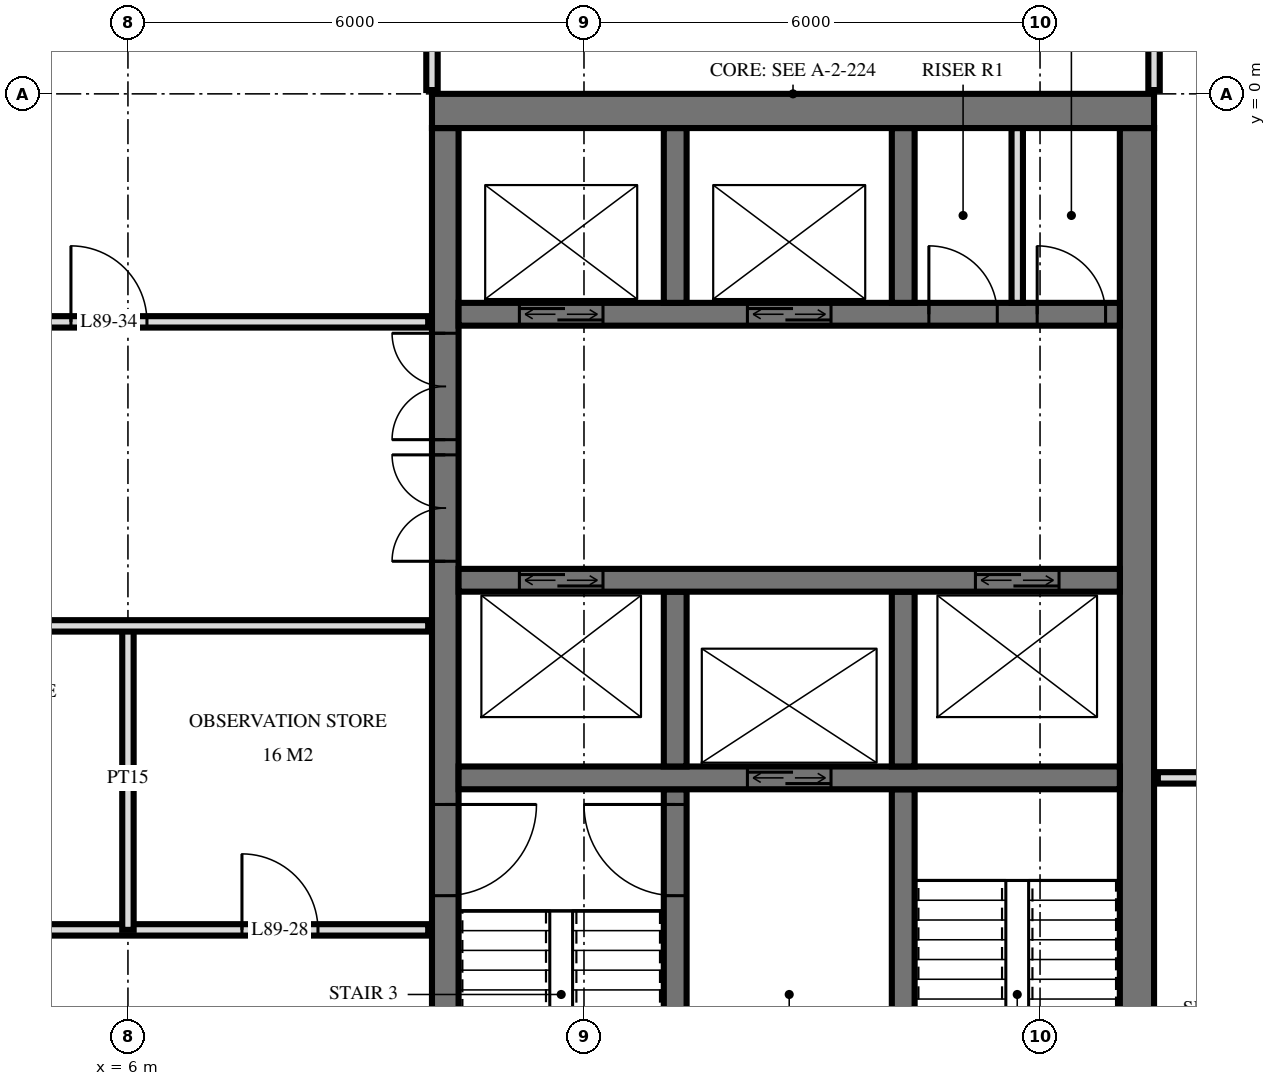
"""IFC4 building model, lengths in metres.
Left out: names, types, materials, properties, quantities, classifications, styles, units other than length and angle.
Written with IfcOpenShell. Run it as: python <this file> out.ifc"""

import sys

from ifc_helpers import new_model, si_unit, direction, frame, frame_2d, origin, place, context, subcontext, project, spatial, rectangle, extrude, element, fill, save


model = new_model("IFC4")
c1 = context("Model", 3, precision=1e-05, world=origin(), true_north=direction((0.0, 1.0)))
c2 = subcontext(c1, "Body", "Model", "MODEL_VIEW")
j1 = project(units=[si_unit("LENGTHUNIT", "METRE"), si_unit("PLANEANGLEUNIT", "RADIAN")], contexts=[c1])
p1 = place(None, origin())
s1 = spatial("IfcSite", under=j1, at=p1, CompositionType="ELEMENT")
p2 = place(p1, origin())
s2 = spatial("IfcBuilding", under=s1, at=p2, CompositionType="ELEMENT")
p3 = place(p2, frame((0.0, 0.0, 338.6)))
s3 = spatial("IfcBuildingStorey", under=s2, at=p3, CompositionType="ELEMENT", Elevation=338.6)
p4 = place(p3, frame((10.0, -0.225, 0.0), z_axis=(0.0, 0.0, 1.0), x_axis=(1.0, 0.0, 0.0)))
e1 = element("IfcWall", 1, at=p4, inside=s3, PredefinedType="SHEAR", context=c2, shape_type="SweptSolid", body=[
    extrude(rectangle(XDim=9.5, YDim=0.45, at=frame_2d((4.75, 0.0))), origin(), (0.0, 0.0, 1.0), 4.0),
])
p5 = place(p3, frame((10.175, -14.55, 0.0), z_axis=(0.0, 0.0, 1.0), x_axis=(0.0, 1.0, 0.0)))
e2 = element("IfcWall", 2, at=p5, inside=s3, PredefinedType="SHEAR", context=c2, shape_type="SweptSolid", body=[
    extrude(rectangle(XDim=14.1, YDim=0.35, at=frame_2d((7.05, 0.0))), origin(), (0.0, 0.0, 1.0), 4.0),
])
p6 = place(p5, frame((8.4, 0.0, 0.0)))
e3 = element("IfcOpeningElement", 3, at=p6, cuts=e2, PredefinedType="OPENING", context=c2, shape_type="SweptSolid", body=[
    extrude(rectangle(XDim=1.4, YDim=2.4, at=frame_2d((0.7, 1.2))), frame((0.0, 0.185, 0.0), z_axis=(0.0, -1.0, 0.0), x_axis=(1.0, 0.0, 0.0)), (0.0, 0.0, 1.0), 0.37),
])
p7 = place(p5, frame((10.0, 0.0, 0.0)))
e4 = element("IfcOpeningElement", 4, at=p7, cuts=e2, PredefinedType="OPENING", context=c2, shape_type="SweptSolid", body=[
    extrude(rectangle(XDim=1.4, YDim=2.4, at=frame_2d((0.7, 1.2))), frame((0.0, 0.185, 0.0), z_axis=(0.0, -1.0, 0.0), x_axis=(1.0, 0.0, 0.0)), (0.0, 0.0, 1.0), 0.37),
])
p8 = place(p5, frame((4.0, 0.0, 0.0)))
e5 = element("IfcOpeningElement", 5, at=p8, cuts=e2, PredefinedType="OPENING", context=c2, shape_type="SweptSolid", body=[
    extrude(rectangle(XDim=1.2, YDim=2.1, at=frame_2d((0.6, 1.05))), frame((0.0, 0.185, 0.0), z_axis=(0.0, -1.0, 0.0), x_axis=(1.0, 0.0, 0.0)), (0.0, 0.0, 1.0), 0.37),
])
p9 = place(p3, frame((19.275, -14.55, 0.0), z_axis=(0.0, 0.0, 1.0), x_axis=(0.0, 1.0, 0.0)))
e6 = element("IfcWall", 6, at=p9, inside=s3, PredefinedType="SHEAR", context=c2, shape_type="SweptSolid", body=[
    extrude(rectangle(XDim=14.1, YDim=0.45, at=frame_2d((7.05, 0.0))), origin(), (0.0, 0.0, 1.0), 4.0),
])
p10 = place(p3, frame((10.35, -2.9, 0.0), z_axis=(0.0, 0.0, 1.0), x_axis=(1.0, 0.0, 0.0)))
e7 = element("IfcWall", 7, at=p10, inside=s3, PredefinedType="SHEAR", context=c2, shape_type="SweptSolid", body=[
    extrude(rectangle(XDim=8.7, YDim=0.3, at=frame_2d((4.35, 0.0))), origin(), (0.0, 0.0, 1.0), 4.0),
])
p11 = place(p10, frame((0.8, 0.0, 0.0)))
e8 = element("IfcOpeningElement", 8, at=p11, cuts=e7, PredefinedType="OPENING", context=c2, shape_type="SweptSolid", body=[
    extrude(rectangle(XDim=1.1, YDim=2.1, at=frame_2d((0.55, 1.05))), frame((0.0, 0.16, 0.0), z_axis=(0.0, -1.0, 0.0), x_axis=(1.0, 0.0, 0.0)), (0.0, 0.0, 1.0), 0.32),
])
p12 = place(p10, frame((3.8, 0.0, 0.0)))
e9 = element("IfcOpeningElement", 9, at=p12, cuts=e7, PredefinedType="OPENING", context=c2, shape_type="SweptSolid", body=[
    extrude(rectangle(XDim=1.1, YDim=2.1, at=frame_2d((0.55, 1.05))), frame((0.0, 0.16, 0.0), z_axis=(0.0, -1.0, 0.0), x_axis=(1.0, 0.0, 0.0)), (0.0, 0.0, 1.0), 0.32),
])
p13 = place(p10, frame((6.188, 0.0, 0.0)))
e10 = element("IfcOpeningElement", 10, at=p13, cuts=e7, PredefinedType="OPENING", context=c2, shape_type="SweptSolid", body=[
    extrude(rectangle(XDim=0.9, YDim=2.1, at=frame_2d((0.45, 1.05))), frame((0.0, 0.16, 0.0), z_axis=(0.0, -1.0, 0.0), x_axis=(1.0, 0.0, 0.0)), (0.0, 0.0, 1.0), 0.32),
])
p14 = place(p10, frame((7.613, 0.0, 0.0)))
e11 = element("IfcOpeningElement", 11, at=p14, cuts=e7, PredefinedType="OPENING", context=c2, shape_type="SweptSolid", body=[
    extrude(rectangle(XDim=0.9, YDim=2.1, at=frame_2d((0.45, 1.05))), frame((0.0, 0.16, 0.0), z_axis=(0.0, -1.0, 0.0), x_axis=(1.0, 0.0, 0.0)), (0.0, 0.0, 1.0), 0.32),
])
p15 = place(p3, frame((10.35, -6.4, 0.0), z_axis=(0.0, 0.0, 1.0), x_axis=(1.0, 0.0, 0.0)))
e12 = element("IfcWall", 12, at=p15, inside=s3, PredefinedType="SHEAR", context=c2, shape_type="SweptSolid", body=[
    extrude(rectangle(XDim=8.7, YDim=0.3, at=frame_2d((4.35, 0.0))), origin(), (0.0, 0.0, 1.0), 4.0),
])
p16 = place(p15, frame((0.8, 0.0, 0.0)))
e13 = element("IfcOpeningElement", 13, at=p16, cuts=e12, PredefinedType="OPENING", context=c2, shape_type="SweptSolid", body=[
    extrude(rectangle(XDim=1.1, YDim=2.1, at=frame_2d((0.55, 1.05))), frame((0.0, 0.16, 0.0), z_axis=(0.0, -1.0, 0.0), x_axis=(1.0, 0.0, 0.0)), (0.0, 0.0, 1.0), 0.32),
])
p17 = place(p15, frame((6.8, 0.0, 0.0)))
e14 = element("IfcOpeningElement", 14, at=p17, cuts=e12, PredefinedType="OPENING", context=c2, shape_type="SweptSolid", body=[
    extrude(rectangle(XDim=1.1, YDim=2.1, at=frame_2d((0.55, 1.05))), frame((0.0, 0.16, 0.0), z_axis=(0.0, -1.0, 0.0), x_axis=(1.0, 0.0, 0.0)), (0.0, 0.0, 1.0), 0.32),
])
p18 = place(p3, frame((10.35, -9.0, 0.0), z_axis=(0.0, 0.0, 1.0), x_axis=(1.0, 0.0, 0.0)))
e15 = element("IfcWall", 15, at=p18, inside=s3, PredefinedType="SHEAR", context=c2, shape_type="SweptSolid", body=[
    extrude(rectangle(XDim=8.7, YDim=0.3, at=frame_2d((4.35, 0.0))), origin(), (0.0, 0.0, 1.0), 4.0),
])
p19 = place(p18, frame((3.8, 0.0, 0.0)))
e16 = element("IfcOpeningElement", 16, at=p19, cuts=e15, PredefinedType="OPENING", context=c2, shape_type="SweptSolid", body=[
    extrude(rectangle(XDim=1.1, YDim=2.1, at=frame_2d((0.55, 1.05))), frame((0.0, 0.16, 0.0), z_axis=(0.0, -1.0, 0.0), x_axis=(1.0, 0.0, 0.0)), (0.0, 0.0, 1.0), 0.32),
])
for number, where, z_axis, x_axis in (
    (17, (13.2, -2.75, 0.0), (0.0, 0.0, 1.0), (0.0, 1.0, 0.0)),
    (18, (13.2, -8.85, 0.0), (0.0, 0.0, 1.0), (0.0, 1.0, 0.0)),
):
    element("IfcWall", number, at=place(p3, frame(where, z_axis=z_axis, x_axis=x_axis)), inside=s3, PredefinedType="SHEAR", context=c2, shape_type="SweptSolid", body=[
        extrude(rectangle(XDim=2.3, YDim=0.3, at=frame_2d((1.15, 0.0))), origin(), (0.0, 0.0, 1.0), 4.0),
    ])
p20 = place(p3, frame((13.2, -14.55, 0.0), z_axis=(0.0, 0.0, 1.0), x_axis=(0.0, 1.0, 0.0)))
e19 = element("IfcWall", 19, at=p20, inside=s3, PredefinedType="SHEAR", context=c2, shape_type="SweptSolid", body=[
    extrude(rectangle(XDim=5.4, YDim=0.3, at=frame_2d((2.7, 0.0))), origin(), (0.0, 0.0, 1.0), 4.0),
])
p21 = place(p20, frame((4.0, 0.0, 0.0)))
e20 = element("IfcOpeningElement", 20, at=p21, cuts=e19, PredefinedType="OPENING", context=c2, shape_type="SweptSolid", body=[
    extrude(rectangle(XDim=1.2, YDim=2.1, at=frame_2d((0.6, 1.05))), frame((0.0, 0.16, 0.0), z_axis=(0.0, -1.0, 0.0), x_axis=(1.0, 0.0, 0.0)), (0.0, 0.0, 1.0), 0.32),
])
for number, where, z_axis, x_axis in (
    (21, (16.2, -2.75, 0.0), (0.0, 0.0, 1.0), (0.0, 1.0, 0.0)),
    (22, (16.2, -8.85, 0.0), (0.0, 0.0, 1.0), (0.0, 1.0, 0.0)),
):
    element("IfcWall", number, at=place(p3, frame(where, z_axis=z_axis, x_axis=x_axis)), inside=s3, PredefinedType="SHEAR", context=c2, shape_type="SweptSolid", body=[
        extrude(rectangle(XDim=2.3, YDim=0.3, at=frame_2d((1.15, 0.0))), origin(), (0.0, 0.0, 1.0), 4.0),
    ])
p22 = place(p3, frame((16.2, -14.55, 0.0), z_axis=(0.0, 0.0, 1.0), x_axis=(0.0, 1.0, 0.0)))
e23 = element("IfcWall", 23, at=p22, inside=s3, PredefinedType="SHEAR", context=c2, shape_type="SweptSolid", body=[
    extrude(rectangle(XDim=5.4, YDim=0.3, at=frame_2d((2.7, 0.0))), origin(), (0.0, 0.0, 1.0), 4.0),
])
p23 = place(p22, frame((0.2, 0.0, 0.0)))
e24 = element("IfcOpeningElement", 24, at=p23, cuts=e23, PredefinedType="OPENING", context=c2, shape_type="SweptSolid", body=[
    extrude(rectangle(XDim=1.2, YDim=2.1, at=frame_2d((0.6, 1.05))), frame((0.0, 0.16, 0.0), z_axis=(0.0, -1.0, 0.0), x_axis=(1.0, 0.0, 0.0)), (0.0, 0.0, 1.0), 0.32),
])
p24 = place(p3, frame((17.7, -2.75, 0.0), z_axis=(0.0, 0.0, 1.0), x_axis=(0.0, 1.0, 0.0)))
e25 = element("IfcWall", 25, at=p24, inside=s3, PredefinedType="PARTITIONING", context=c2, shape_type="SweptSolid", body=[
    extrude(rectangle(XDim=2.3, YDim=0.15, at=frame_2d((1.15, 0.0))), origin(), (0.0, 0.0, 1.0), 3.7),
])
p25 = place(p3, frame((19.5, 0.05, 0.0), z_axis=(0.0, 0.0, 1.0), x_axis=(0.0, 1.0, 0.0)))
e26 = element("IfcWall", 26, at=p25, inside=s3, PredefinedType="PARTITIONING", context=c2, shape_type="SweptSolid", body=[
    extrude(rectangle(XDim=4.403, YDim=0.15, at=frame_2d((2.202, 0.0))), origin(), (0.0, 0.0, 1.0), 3.72),
])
p26 = place(p3, frame((10.0, 0.05, 0.0), z_axis=(0.0, 0.0, 1.0), x_axis=(0.0, 1.0, 0.0)))
e27 = element("IfcWall", 27, at=p26, inside=s3, PredefinedType="PARTITIONING", context=c2, shape_type="SweptSolid", body=[
    extrude(rectangle(XDim=4.702, YDim=0.15, at=frame_2d((2.351, 0.0))), origin(), (0.0, 0.0, 1.0), 3.72),
])
p27 = place(p3, frame((6.0, -11.0, 0.0), z_axis=(0.0, 0.0, 1.0), x_axis=(0.0, 1.0, 0.0)))
e28 = element("IfcWall", 28, at=p27, inside=s3, PredefinedType="PARTITIONING", context=c2, shape_type="SweptSolid", body=[
    extrude(rectangle(XDim=4.0, YDim=0.15, at=frame_2d((2.0, 0.0))), origin(), (0.0, 0.0, 1.0), 3.72),
])
p28 = place(p3, frame((-9.95, -11.0, 0.0), z_axis=(0.0, 0.0, 1.0), x_axis=(1.0, 0.0, 0.0)))
e29 = element("IfcWall", 29, at=p28, inside=s3, PredefinedType="PARTITIONING", context=c2, shape_type="SweptSolid", body=[
    extrude(rectangle(XDim=19.9, YDim=0.15, at=frame_2d((9.95, 0.0))), origin(), (0.0, 0.0, 1.0), 3.72),
])
p29 = place(p28, frame((9.45, 0.0, 0.0)))
e30 = element("IfcOpeningElement", 30, at=p29, cuts=e29, PredefinedType="OPENING", context=c2, shape_type="SweptSolid", body=[
    extrude(rectangle(XDim=1.0, YDim=2.1, at=frame_2d((0.5, 1.05))), frame((0.0, 0.085, 0.0), z_axis=(0.0, -1.0, 0.0), x_axis=(1.0, 0.0, 0.0)), (0.0, 0.0, 1.0), 0.17),
])
p30 = place(p28, frame((17.45, 0.0, 0.0)))
e31 = element("IfcOpeningElement", 31, at=p30, cuts=e29, PredefinedType="OPENING", context=c2, shape_type="SweptSolid", body=[
    extrude(rectangle(XDim=1.0, YDim=2.1, at=frame_2d((0.5, 1.05))), frame((0.0, 0.085, 0.0), z_axis=(0.0, -1.0, 0.0), x_axis=(1.0, 0.0, 0.0)), (0.0, 0.0, 1.0), 0.17),
])
p31 = place(p3, frame((19.55, -9.0, 0.0), z_axis=(0.0, 0.0, 1.0), x_axis=(1.0, 0.0, 0.0)))
e32 = element("IfcWall", 32, at=p31, inside=s3, PredefinedType="PARTITIONING", context=c2, shape_type="SweptSolid", body=[
    extrude(rectangle(XDim=2.753, YDim=0.15, at=frame_2d((1.377, 0.0))), origin(), (0.0, 0.0, 1.0), 3.72),
])
p32 = place(p31, frame((0.992, 0.0, 0.0)))
e33 = element("IfcOpeningElement", 33, at=p32, cuts=e32, PredefinedType="OPENING", context=c2, shape_type="SweptSolid", body=[
    extrude(rectangle(XDim=0.9, YDim=2.1, at=frame_2d((0.45, 1.05))), frame((0.0, 0.085, 0.0), z_axis=(0.0, -1.0, 0.0), x_axis=(1.0, 0.0, 0.0)), (0.0, 0.0, 1.0), 0.17),
])
p33 = place(p3, frame((-9.95, -7.0, 0.0), z_axis=(0.0, 0.0, 1.0), x_axis=(1.0, 0.0, 0.0)))
e34 = element("IfcWall", 34, at=p33, inside=s3, PredefinedType="PARTITIONING", context=c2, shape_type="SweptSolid", body=[
    extrude(rectangle(XDim=19.9, YDim=0.15, at=frame_2d((9.95, 0.0))), origin(), (0.0, 0.0, 1.0), 3.72),
])
p34 = place(p33, frame((9.45, 0.0, 0.0)))
e35 = element("IfcOpeningElement", 35, at=p34, cuts=e34, PredefinedType="OPENING", context=c2, shape_type="SweptSolid", body=[
    extrude(rectangle(XDim=1.0, YDim=2.1, at=frame_2d((0.5, 1.05))), frame((0.0, 0.085, 0.0), z_axis=(0.0, -1.0, 0.0), x_axis=(1.0, 0.0, 0.0)), (0.0, 0.0, 1.0), 0.17),
])
p35 = place(p33, frame((1.45, 0.0, 0.0)))
e36 = element("IfcOpeningElement", 36, at=p35, cuts=e34, PredefinedType="OPENING", context=c2, shape_type="SweptSolid", body=[
    extrude(rectangle(XDim=1.0, YDim=2.1, at=frame_2d((0.5, 1.05))), frame((0.0, 0.085, 0.0), z_axis=(0.0, -1.0, 0.0), x_axis=(1.0, 0.0, 0.0)), (0.0, 0.0, 1.0), 0.17),
])
p36 = place(p3, frame((-9.95, -3.0, 0.0), z_axis=(0.0, 0.0, 1.0), x_axis=(1.0, 0.0, 0.0)))
e37 = element("IfcWall", 37, at=p36, inside=s3, PredefinedType="PARTITIONING", context=c2, shape_type="SweptSolid", body=[
    extrude(rectangle(XDim=19.9, YDim=0.15, at=frame_2d((9.95, 0.0))), origin(), (0.0, 0.0, 1.0), 3.72),
])
p37 = place(p36, frame((2.45, 0.0, 0.0)))
e38 = element("IfcOpeningElement", 38, at=p37, cuts=e37, PredefinedType="OPENING", context=c2, shape_type="SweptSolid", body=[
    extrude(rectangle(XDim=1.0, YDim=2.1, at=frame_2d((0.5, 1.05))), frame((0.0, 0.085, 0.0), z_axis=(0.0, -1.0, 0.0), x_axis=(1.0, 0.0, 0.0)), (0.0, 0.0, 1.0), 0.17),
])
p38 = place(p36, frame((6.95, 0.0, 0.0)))
e39 = element("IfcOpeningElement", 39, at=p38, cuts=e37, PredefinedType="OPENING", context=c2, shape_type="SweptSolid", body=[
    extrude(rectangle(XDim=1.0, YDim=2.1, at=frame_2d((0.5, 1.05))), frame((0.0, 0.085, 0.0), z_axis=(0.0, -1.0, 0.0), x_axis=(1.0, 0.0, 0.0)), (0.0, 0.0, 1.0), 0.17),
])
p39 = place(p36, frame((9.7, 0.0, 0.0)))
e40 = element("IfcOpeningElement", 40, at=p39, cuts=e37, PredefinedType="OPENING", context=c2, shape_type="SweptSolid", body=[
    extrude(rectangle(XDim=1.0, YDim=2.1, at=frame_2d((0.5, 1.05))), frame((0.0, 0.085, 0.0), z_axis=(0.0, -1.0, 0.0), x_axis=(1.0, 0.0, 0.0)), (0.0, 0.0, 1.0), 0.17),
])
p40 = place(p36, frame((15.2, 0.0, 0.0)))
e41 = element("IfcOpeningElement", 41, at=p40, cuts=e37, PredefinedType="OPENING", context=c2, shape_type="SweptSolid", body=[
    extrude(rectangle(XDim=1.0, YDim=2.1, at=frame_2d((0.5, 1.05))), frame((0.0, 0.085, 0.0), z_axis=(0.0, -1.0, 0.0), x_axis=(1.0, 0.0, 0.0)), (0.0, 0.0, 1.0), 0.17),
])
p41 = place(p11, origin())
e42 = element("IfcDoor", 42, at=p41, inside=s3, OperationType="DOUBLE_DOOR_SLIDING", PredefinedType="USERDEFINED", context=c2, shape_type="SweptSolid", body=[
    extrude(rectangle(XDim=1.1, YDim=2.1, at=frame_2d((0.55, 1.05))), frame((0.0, 0.025, 0.0), z_axis=(0.0, -1.0, 0.0), x_axis=(1.0, 0.0, 0.0)), (0.0, 0.0, 1.0), 0.05),
])
fill(e8, e42)
p42 = place(p12, origin())
e43 = element("IfcDoor", 43, at=p42, inside=s3, OperationType="DOUBLE_DOOR_SLIDING", PredefinedType="USERDEFINED", context=c2, shape_type="SweptSolid", body=[
    extrude(rectangle(XDim=1.1, YDim=2.1, at=frame_2d((0.55, 1.05))), frame((0.0, 0.025, 0.0), z_axis=(0.0, -1.0, 0.0), x_axis=(1.0, 0.0, 0.0)), (0.0, 0.0, 1.0), 0.05),
])
fill(e9, e43)
p43 = place(p16, origin())
e44 = element("IfcDoor", 44, at=p43, inside=s3, OperationType="DOUBLE_DOOR_SLIDING", PredefinedType="USERDEFINED", context=c2, shape_type="SweptSolid", body=[
    extrude(rectangle(XDim=1.1, YDim=2.1, at=frame_2d((0.55, 1.05))), frame((0.0, 0.025, 0.0), z_axis=(0.0, -1.0, 0.0), x_axis=(1.0, 0.0, 0.0)), (0.0, 0.0, 1.0), 0.05),
])
fill(e13, e44)
p44 = place(p19, origin())
e45 = element("IfcDoor", 45, at=p44, inside=s3, OperationType="DOUBLE_DOOR_SLIDING", PredefinedType="USERDEFINED", context=c2, shape_type="SweptSolid", body=[
    extrude(rectangle(XDim=1.1, YDim=2.1, at=frame_2d((0.55, 1.05))), frame((0.0, 0.025, 0.0), z_axis=(0.0, -1.0, 0.0), x_axis=(1.0, 0.0, 0.0)), (0.0, 0.0, 1.0), 0.05),
])
fill(e16, e45)
p45 = place(p17, origin())
e46 = element("IfcDoor", 46, at=p45, inside=s3, OperationType="DOUBLE_DOOR_SLIDING", PredefinedType="USERDEFINED", context=c2, shape_type="SweptSolid", body=[
    extrude(rectangle(XDim=1.1, YDim=2.1, at=frame_2d((0.55, 1.05))), frame((0.0, 0.025, 0.0), z_axis=(0.0, -1.0, 0.0), x_axis=(1.0, 0.0, 0.0)), (0.0, 0.0, 1.0), 0.05),
])
fill(e14, e46)
p46 = place(p6, origin())
e47 = element("IfcDoor", 47, at=p46, inside=s3, OperationType="DOUBLE_DOOR_SINGLE_SWING", PredefinedType="DOOR", context=c2, shape_type="SweptSolid", body=[
    extrude(rectangle(XDim=1.4, YDim=2.4, at=frame_2d((0.7, 1.2))), frame((0.0, 0.025, 0.0), z_axis=(0.0, -1.0, 0.0), x_axis=(1.0, 0.0, 0.0)), (0.0, 0.0, 1.0), 0.05),
])
fill(e3, e47)
p47 = place(p7, origin())
e48 = element("IfcDoor", 48, at=p47, inside=s3, OperationType="DOUBLE_DOOR_SINGLE_SWING", PredefinedType="DOOR", context=c2, shape_type="SweptSolid", body=[
    extrude(rectangle(XDim=1.4, YDim=2.4, at=frame_2d((0.7, 1.2))), frame((0.0, 0.025, 0.0), z_axis=(0.0, -1.0, 0.0), x_axis=(1.0, 0.0, 0.0)), (0.0, 0.0, 1.0), 0.05),
])
fill(e4, e48)
p48 = place(p8, frame((0.6, 0.0, 0.0), z_axis=(0.0, 0.0, 1.0), x_axis=(-1.0, 0.0, 0.0)))
e49 = element("IfcDoor", 49, at=p48, inside=s3, OperationType="SINGLE_SWING_RIGHT", PredefinedType="DOOR", context=c2, shape_type="SweptSolid", body=[
    extrude(rectangle(XDim=1.2, YDim=2.1, at=frame_2d((0.0, 1.05))), frame((0.0, -0.025, 0.0), z_axis=(0.0, 1.0, 0.0), x_axis=(-1.0, 0.0, 0.0)), (0.0, 0.0, 1.0), 0.05),
])
fill(e5, e49)
p49 = place(p13, origin())
e50 = element("IfcDoor", 50, at=p49, inside=s3, OperationType="SINGLE_SWING_RIGHT", PredefinedType="DOOR", context=c2, shape_type="SweptSolid", body=[
    extrude(rectangle(XDim=0.9, YDim=2.1, at=frame_2d((0.45, 1.05))), frame((0.0, 0.025, 0.0), z_axis=(0.0, -1.0, 0.0), x_axis=(1.0, 0.0, 0.0)), (0.0, 0.0, 1.0), 0.05),
])
fill(e10, e50)
p50 = place(p14, origin())
e51 = element("IfcDoor", 51, at=p50, inside=s3, OperationType="SINGLE_SWING_RIGHT", PredefinedType="DOOR", context=c2, shape_type="SweptSolid", body=[
    extrude(rectangle(XDim=0.9, YDim=2.1, at=frame_2d((0.45, 1.05))), frame((0.0, 0.025, 0.0), z_axis=(0.0, -1.0, 0.0), x_axis=(1.0, 0.0, 0.0)), (0.0, 0.0, 1.0), 0.05),
])
fill(e11, e51)
p51 = place(p21, origin())
e52 = element("IfcDoor", 52, at=p51, inside=s3, OperationType="SINGLE_SWING_LEFT", PredefinedType="DOOR", context=c2, shape_type="SweptSolid", body=[
    extrude(rectangle(XDim=1.2, YDim=2.1, at=frame_2d((0.6, 1.05))), frame((0.0, 0.025, 0.0), z_axis=(0.0, -1.0, 0.0), x_axis=(1.0, 0.0, 0.0)), (0.0, 0.0, 1.0), 0.05),
])
fill(e20, e52)
p52 = place(p30, origin())
e53 = element("IfcDoor", 53, at=p52, inside=s3, OperationType="SINGLE_SWING_RIGHT", PredefinedType="DOOR", context=c2, shape_type="SweptSolid", body=[
    extrude(rectangle(XDim=1.0, YDim=2.1, at=frame_2d((0.5, 1.05))), frame((0.0, 0.025, 0.0), z_axis=(0.0, -1.0, 0.0), x_axis=(1.0, 0.0, 0.0)), (0.0, 0.0, 1.0), 0.05),
])
fill(e31, e53)
p53 = place(p40, origin())
e54 = element("IfcDoor", 54, at=p53, inside=s3, OperationType="SINGLE_SWING_RIGHT", PredefinedType="DOOR", context=c2, shape_type="SweptSolid", body=[
    extrude(rectangle(XDim=1.0, YDim=2.1, at=frame_2d((0.5, 1.05))), frame((0.0, 0.025, 0.0), z_axis=(0.0, -1.0, 0.0), x_axis=(1.0, 0.0, 0.0)), (0.0, 0.0, 1.0), 0.05),
])
fill(e41, e54)
save(model, sys.argv[1])
